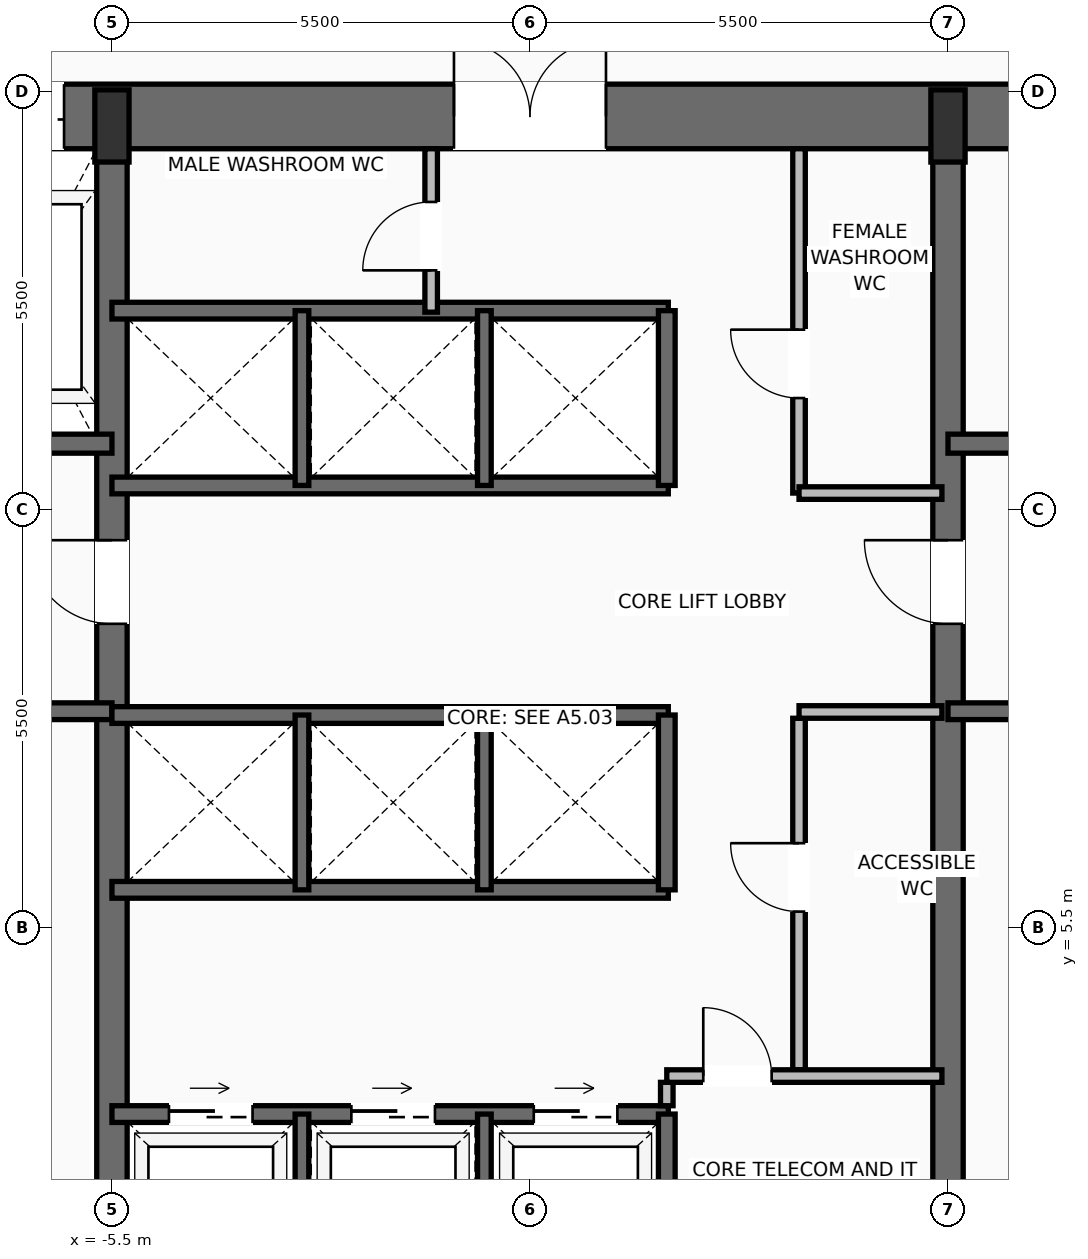
"""IFC4 building model, lengths in metres.
Left out: names, types, materials, properties, quantities, classifications, styles, units other than length and angle.
Written with IfcOpenShell. Run it as: python <this file> out.ifc"""

import sys

from ifc_helpers import new_model, si_unit, direction, frame, frame_2d, origin, origin_2d, place, context, subcontext, project, spatial, rectangle, extrude, source, transform, mapped, element, fill, save


model = new_model("IFC4")
c1 = context("Model", 3, precision=1e-05, world=origin(), true_north=direction((0.0, 1.0)))
c2 = subcontext(c1, "Body", "Model", "MODEL_VIEW")
j1 = project(units=[si_unit("LENGTHUNIT", "METRE"), si_unit("PLANEANGLEUNIT", "RADIAN")], contexts=[c1])
p1 = place(None, origin())
s1 = spatial("IfcSite", under=j1, at=p1, CompositionType="ELEMENT")
p2 = place(p1, origin())
s2 = spatial("IfcBuilding", under=s1, at=p2, CompositionType="ELEMENT")
p3 = place(p2, frame((0.0, 0.0, 46.0)))
s3 = spatial("IfcBuildingStorey", under=s2, at=p3, CompositionType="ELEMENT", Elevation=46.0)
p4 = place(p3, frame((-11.0, 16.175, 0.0), z_axis=(0.0, 0.0, 1.0), x_axis=(1.0, 0.0, 0.0)))
e1 = element("IfcWall", 1, at=p4, inside=s3, PredefinedType="SHEAR", context=c2, shape_type="SweptSolid", body=[
    extrude(rectangle(XDim=22.0, YDim=0.85, at=frame_2d((11.0, 0.0))), origin(), (0.0, 0.0, 1.0), 3.45),
])
p5 = place(p4, frame((3.57, 0.0, 0.0)))
e2 = element("IfcOpeningElement", 2, at=p5, cuts=e1, PredefinedType="OPENING", context=c2, shape_type="SweptSolid", body=[
    extrude(rectangle(XDim=1.3, YDim=2.3, at=frame_2d((0.65, 1.15))), frame((0.0, 0.435, 0.0), z_axis=(0.0, -1.0, 0.0), x_axis=(1.0, 0.0, 0.0)), (0.0, 0.0, 1.0), 0.87),
])
p6 = place(p4, frame((10.0, 0.0, 0.0)))
e3 = element("IfcOpeningElement", 3, at=p6, cuts=e1, PredefinedType="OPENING", context=c2, shape_type="SweptSolid", body=[
    extrude(rectangle(XDim=2.0, YDim=2.4, at=frame_2d((1.0, 1.2))), frame((0.0, 0.435, 0.0), z_axis=(0.0, -1.0, 0.0), x_axis=(1.0, 0.0, 0.0)), (0.0, 0.0, 1.0), 0.87),
])
p7 = place(p3, frame((-5.5, 0.425, 0.0), z_axis=(0.0, 0.0, 1.0), x_axis=(0.0, 1.0, 0.0)))
e4 = element("IfcWall", 4, at=p7, inside=s3, PredefinedType="SHEAR", context=c2, shape_type="SweptSolid", body=[
    extrude(rectangle(XDim=15.75, YDim=0.4, at=frame_2d((7.875, 0.0))), origin(), (0.0, 0.0, 1.0), 3.45),
])
p8 = place(p7, frame((9.075, 0.0, 0.0)))
e5 = element("IfcOpeningElement", 5, at=p8, cuts=e4, PredefinedType="OPENING", context=c2, shape_type="SweptSolid", body=[
    extrude(rectangle(XDim=1.1, YDim=2.2, at=frame_2d((0.55, 1.1))), frame((0.0, 0.21, 0.0), z_axis=(0.0, -1.0, 0.0), x_axis=(1.0, 0.0, 0.0)), (0.0, 0.0, 1.0), 0.42),
])
p9 = place(p3, frame((5.5, 0.425, 0.0), z_axis=(0.0, 0.0, 1.0), x_axis=(0.0, 1.0, 0.0)))
e6 = element("IfcWall", 6, at=p9, inside=s3, PredefinedType="SHEAR", context=c2, shape_type="SweptSolid", body=[
    extrude(rectangle(XDim=15.75, YDim=0.4, at=frame_2d((7.875, 0.0))), origin(), (0.0, 0.0, 1.0), 3.45),
])
p10 = place(p9, frame((9.075, 0.0, 0.0)))
e7 = element("IfcOpeningElement", 7, at=p10, cuts=e6, PredefinedType="OPENING", context=c2, shape_type="SweptSolid", body=[
    extrude(rectangle(XDim=1.1, YDim=2.2, at=frame_2d((0.55, 1.1))), frame((0.0, 0.21, 0.0), z_axis=(0.0, -1.0, 0.0), x_axis=(1.0, 0.0, 0.0)), (0.0, 0.0, 1.0), 0.42),
])
m1 = source(origin(), c2, "Body", "SweptSolid", [
    extrude(rectangle(XDim=0.45, YDim=0.95, at=origin_2d()), origin(), (0.0, 0.0, 1.0), 3.7),
])
for number, where, z_axis, x_axis in (
    (8, (-5.5, 16.05, 0.0), (0.0, 0.0, 1.0), (1.0, 0.0, 0.0)),
    (9, (5.5, 16.05, 0.0), (0.0, 0.0, 1.0), (1.0, 0.0, 0.0)),
):
    element("IfcColumn", number, at=place(p3, frame(where, z_axis=z_axis, x_axis=x_axis)), inside=s3, PredefinedType="PILASTER", context=c2, shape_type="MappedRepresentation", body=[
        mapped(m1, transform((0.0, 0.0, 0.0), scale=1.0)),
    ])
p11 = place(p3, frame((-5.5, 8.35, 0.0), z_axis=(0.0, 0.0, 1.0), x_axis=(-1.0, 0.0, 0.0)))
e10 = element("IfcWall", 10, at=p11, inside=s3, PredefinedType="SOLIDWALL", context=c2, shape_type="SweptSolid", body=[
    extrude(rectangle(XDim=4.65, YDim=0.22, at=frame_2d((2.325, 0.0))), origin(), (0.0, 0.0, 1.0), 3.45),
])
p12 = place(p11, frame((2.5, 0.0, 0.0)))
e11 = element("IfcOpeningElement", 11, at=p12, cuts=e10, PredefinedType="OPENING", context=c2, shape_type="SweptSolid", body=[
    extrude(rectangle(XDim=1.15, YDim=2.2, at=frame_2d((0.575, 1.1))), frame((0.0, 0.12, 0.0), z_axis=(0.0, -1.0, 0.0), x_axis=(1.0, 0.0, 0.0)), (0.0, 0.0, 1.0), 0.24),
])
p13 = place(p3, frame((-5.5, 11.87, 0.0), z_axis=(0.0, 0.0, 1.0), x_axis=(-1.0, 0.0, 0.0)))
e12 = element("IfcWall", 12, at=p13, inside=s3, PredefinedType="SOLIDWALL", context=c2, shape_type="SweptSolid", body=[
    extrude(rectangle(XDim=4.65, YDim=0.25, at=frame_2d((2.325, 0.0))), origin(), (0.0, 0.0, 1.0), 3.45),
])
p14 = place(p13, frame((2.95, 0.0, 0.0)))
e13 = element("IfcOpeningElement", 13, at=p14, cuts=e12, PredefinedType="OPENING", context=c2, shape_type="SweptSolid", body=[
    extrude(rectangle(XDim=1.2, YDim=2.25, at=frame_2d((0.6, 1.125))), frame((0.0, 0.135, 0.0), z_axis=(0.0, -1.0, 0.0), x_axis=(1.0, 0.0, 0.0)), (0.0, 0.0, 1.0), 0.27),
])
p15 = place(p3, frame((10.15, 8.35, 0.0), z_axis=(0.0, 0.0, 1.0), x_axis=(-1.0, 0.0, 0.0)))
e14 = element("IfcWall", 14, at=p15, inside=s3, PredefinedType="SOLIDWALL", context=c2, shape_type="SweptSolid", body=[
    extrude(rectangle(XDim=4.65, YDim=0.22, at=frame_2d((2.325, 0.0))), origin(), (0.0, 0.0, 1.0), 3.45),
])
p16 = place(p15, frame((1.0, 0.0, 0.0)))
e15 = element("IfcOpeningElement", 15, at=p16, cuts=e14, PredefinedType="OPENING", context=c2, shape_type="SweptSolid", body=[
    extrude(rectangle(XDim=1.15, YDim=2.2, at=frame_2d((0.575, 1.1))), frame((0.0, 0.12, 0.0), z_axis=(0.0, -1.0, 0.0), x_axis=(1.0, 0.0, 0.0)), (0.0, 0.0, 1.0), 0.24),
])
p17 = place(p3, frame((10.15, 11.87, 0.0), z_axis=(0.0, 0.0, 1.0), x_axis=(-1.0, 0.0, 0.0)))
e16 = element("IfcWall", 16, at=p17, inside=s3, PredefinedType="SOLIDWALL", context=c2, shape_type="SweptSolid", body=[
    extrude(rectangle(XDim=4.65, YDim=0.25, at=frame_2d((2.325, 0.0))), origin(), (0.0, 0.0, 1.0), 3.45),
])
p18 = place(p17, frame((0.5, 0.0, 0.0)))
e17 = element("IfcOpeningElement", 17, at=p18, cuts=e16, PredefinedType="OPENING", context=c2, shape_type="SweptSolid", body=[
    extrude(rectangle(XDim=1.2, YDim=2.25, at=frame_2d((0.6, 1.125))), frame((0.0, 0.135, 0.0), z_axis=(0.0, -1.0, 0.0), x_axis=(1.0, 0.0, 0.0)), (0.0, 0.0, 1.0), 0.27),
])
p19 = place(p3, frame((-5.5, 3.05, 0.0), z_axis=(0.0, 0.0, 1.0), x_axis=(1.0, 0.0, 0.0)))
e18 = element("IfcWall", 18, at=p19, inside=s3, PredefinedType="SOLIDWALL", context=c2, shape_type="SweptSolid", body=[
    extrude(rectangle(XDim=7.32, YDim=0.22, at=frame_2d((3.66, 0.0))), origin(), (0.0, 0.0, 1.0), 3.45),
])
p20 = place(p19, frame((0.75, 0.0, 0.0)))
e19 = element("IfcOpeningElement", 19, at=p20, cuts=e18, PredefinedType="OPENING", context=c2, shape_type="SweptSolid", body=[
    extrude(rectangle(XDim=1.1, YDim=2.2, at=frame_2d((0.55, 1.1))), frame((0.0, 0.12, 0.0), z_axis=(0.0, -1.0, 0.0), x_axis=(1.0, 0.0, 0.0)), (0.0, 0.0, 1.0), 0.24),
])
p21 = place(p19, frame((3.15, 0.0, 0.0)))
e20 = element("IfcOpeningElement", 20, at=p21, cuts=e18, PredefinedType="OPENING", context=c2, shape_type="SweptSolid", body=[
    extrude(rectangle(XDim=1.1, YDim=2.2, at=frame_2d((0.55, 1.1))), frame((0.0, 0.12, 0.0), z_axis=(0.0, -1.0, 0.0), x_axis=(1.0, 0.0, 0.0)), (0.0, 0.0, 1.0), 0.24),
])
p22 = place(p19, frame((5.55, 0.0, 0.0)))
e21 = element("IfcOpeningElement", 21, at=p22, cuts=e18, PredefinedType="OPENING", context=c2, shape_type="SweptSolid", body=[
    extrude(rectangle(XDim=1.1, YDim=2.2, at=frame_2d((0.55, 1.1))), frame((0.0, 0.12, 0.0), z_axis=(0.0, -1.0, 0.0), x_axis=(1.0, 0.0, 0.0)), (0.0, 0.0, 1.0), 0.24),
])
p23 = place(p3, frame((1.8, 0.85, 0.0), z_axis=(0.0, 0.0, 1.0), x_axis=(0.0, 1.0, 0.0)))
e22 = element("IfcWall", 22, at=p23, inside=s3, PredefinedType="SOLIDWALL", context=c2, shape_type="SweptSolid", body=[
    extrude(rectangle(XDim=2.2, YDim=0.22, at=frame_2d((1.1, 0.0))), origin(), (0.0, 0.0, 1.0), 3.45),
])
for number, where, z_axis, x_axis in (
    (23, (-3.0, 0.85, 0.0), (0.0, 0.0, 1.0), (0.0, 1.0, 0.0)),
    (24, (-0.6, 0.85, 0.0), (0.0, 0.0, 1.0), (0.0, 1.0, 0.0)),
):
    element("IfcWall", number, at=place(p3, frame(where, z_axis=z_axis, x_axis=x_axis)), inside=s3, PredefinedType="SOLIDWALL", context=c2, shape_type="SweptSolid", body=[
        extrude(rectangle(XDim=2.2, YDim=0.18, at=frame_2d((1.1, 0.0))), origin(), (0.0, 0.0, 1.0), 3.45),
    ])
p24 = place(p3, frame((1.8, 3.16, 0.0), z_axis=(0.0, 0.0, 1.0), x_axis=(0.0, 1.0, 0.0)))
e25 = element("IfcWall", 25, at=p24, inside=s3, PredefinedType="PARTITIONING", context=c2, shape_type="SweptSolid", body=[
    extrude(rectangle(XDim=0.308, YDim=0.165, at=frame_2d((0.154, 0.0))), origin(), (0.0, 0.0, 1.0), 3.442),
])
p25 = place(p3, frame((3.54, 3.633, 0.0), z_axis=(0.0, 0.0, 1.0), x_axis=(0.0, 1.0, 0.0)))
e26 = element("IfcWall", 26, at=p25, inside=s3, PredefinedType="PARTITIONING", context=c2, shape_type="SweptSolid", body=[
    extrude(rectangle(XDim=4.625, YDim=0.165, at=frame_2d((2.312, 0.0))), origin(), (0.0, 0.0, 1.0), 3.442),
])
p26 = place(p25, frame((2.081, 0.0, 0.0)))
e27 = element("IfcOpeningElement", 27, at=p26, cuts=e26, PredefinedType="OPENING", context=c2, shape_type="SweptSolid", body=[
    extrude(rectangle(XDim=0.9, YDim=2.1, at=frame_2d((0.45, 1.05))), frame((0.0, 0.093, 0.0), z_axis=(0.0, -1.0, 0.0), x_axis=(1.0, 0.0, 0.0)), (0.0, 0.0, 1.0), 0.185),
])
p27 = place(p3, frame((3.54, 8.34, 0.0), z_axis=(0.0, 0.0, 1.0), x_axis=(1.0, 0.0, 0.0)))
e28 = element("IfcWall", 28, at=p27, inside=s3, PredefinedType="PARTITIONING", context=c2, shape_type="SweptSolid", body=[
    extrude(rectangle(XDim=1.88, YDim=0.165, at=frame_2d((0.94, 0.0))), origin(), (0.0, 0.0, 1.0), 3.442),
])
p28 = place(p3, frame((1.8, 3.55, 0.0), z_axis=(0.0, 0.0, 1.0), x_axis=(1.0, 0.0, 0.0)))
e29 = element("IfcWall", 29, at=p28, inside=s3, PredefinedType="PARTITIONING", context=c2, shape_type="SweptSolid", body=[
    extrude(rectangle(XDim=3.62, YDim=0.165, at=frame_2d((1.81, 0.0))), origin(), (0.0, 0.0, 1.0), 3.442),
])
p29 = place(p28, frame((0.48, 0.0, 0.0)))
e30 = element("IfcOpeningElement", 30, at=p29, cuts=e29, PredefinedType="OPENING", context=c2, shape_type="SweptSolid", body=[
    extrude(rectangle(XDim=0.9, YDim=2.1, at=frame_2d((0.45, 1.05))), frame((0.0, 0.093, 0.0), z_axis=(0.0, -1.0, 0.0), x_axis=(1.0, 0.0, 0.0)), (0.0, 0.0, 1.0), 0.185),
])
for number, where, z_axis, x_axis in (
    (31, (-5.5, 6.0, 0.0), (0.0, 0.0, 1.0), (1.0, 0.0, 0.0)),
    (32, (-5.5, 8.3, 0.0), (0.0, 0.0, 1.0), (1.0, 0.0, 0.0)),
):
    element("IfcWall", number, at=place(p3, frame(where, z_axis=z_axis, x_axis=x_axis)), inside=s3, PredefinedType="SOLIDWALL", context=c2, shape_type="SweptSolid", body=[
        extrude(rectangle(XDim=7.32, YDim=0.22, at=frame_2d((3.66, 0.0))), origin(), (0.0, 0.0, 1.0), 3.45),
    ])
p30 = place(p3, frame((1.8, 6.0, 0.0), z_axis=(0.0, 0.0, 1.0), x_axis=(0.0, 1.0, 0.0)))
e33 = element("IfcWall", 33, at=p30, inside=s3, PredefinedType="SOLIDWALL", context=c2, shape_type="SweptSolid", body=[
    extrude(rectangle(XDim=2.3, YDim=0.22, at=frame_2d((1.15, 0.0))), origin(), (0.0, 0.0, 1.0), 3.45),
])
for number, where, z_axis, x_axis in (
    (34, (-3.0, 6.0, 0.0), (0.0, 0.0, 1.0), (0.0, 1.0, 0.0)),
    (35, (-0.6, 6.0, 0.0), (0.0, 0.0, 1.0), (0.0, 1.0, 0.0)),
):
    element("IfcWall", number, at=place(p3, frame(where, z_axis=z_axis, x_axis=x_axis)), inside=s3, PredefinedType="SOLIDWALL", context=c2, shape_type="SweptSolid", body=[
        extrude(rectangle(XDim=2.3, YDim=0.18, at=frame_2d((1.15, 0.0))), origin(), (0.0, 0.0, 1.0), 3.45),
    ])
for number, where, z_axis, x_axis in (
    (36, (-5.5, 11.32, 0.0), (0.0, 0.0, 1.0), (1.0, 0.0, 0.0)),
    (37, (-5.5, 13.62, 0.0), (0.0, 0.0, 1.0), (1.0, 0.0, 0.0)),
):
    element("IfcWall", number, at=place(p3, frame(where, z_axis=z_axis, x_axis=x_axis)), inside=s3, PredefinedType="SOLIDWALL", context=c2, shape_type="SweptSolid", body=[
        extrude(rectangle(XDim=7.32, YDim=0.22, at=frame_2d((3.66, 0.0))), origin(), (0.0, 0.0, 1.0), 3.45),
    ])
p31 = place(p3, frame((1.8, 11.32, 0.0), z_axis=(0.0, 0.0, 1.0), x_axis=(0.0, 1.0, 0.0)))
e38 = element("IfcWall", 38, at=p31, inside=s3, PredefinedType="SOLIDWALL", context=c2, shape_type="SweptSolid", body=[
    extrude(rectangle(XDim=2.3, YDim=0.22, at=frame_2d((1.15, 0.0))), origin(), (0.0, 0.0, 1.0), 3.45),
])
for number, where, z_axis, x_axis in (
    (39, (-3.0, 11.32, 0.0), (0.0, 0.0, 1.0), (0.0, 1.0, 0.0)),
    (40, (-0.6, 11.32, 0.0), (0.0, 0.0, 1.0), (0.0, 1.0, 0.0)),
):
    element("IfcWall", number, at=place(p3, frame(where, z_axis=z_axis, x_axis=x_axis)), inside=s3, PredefinedType="SOLIDWALL", context=c2, shape_type="SweptSolid", body=[
        extrude(rectangle(XDim=2.3, YDim=0.18, at=frame_2d((1.15, 0.0))), origin(), (0.0, 0.0, 1.0), 3.45),
    ])
p32 = place(p3, frame((-1.3, 13.6, 0.0), z_axis=(0.0, 0.0, 1.0), x_axis=(0.0, 1.0, 0.0)))
e41 = element("IfcWall", 41, at=p32, inside=s3, PredefinedType="PARTITIONING", context=c2, shape_type="SweptSolid", body=[
    extrude(rectangle(XDim=2.15, YDim=0.165, at=frame_2d((1.075, 0.0))), origin(), (0.0, 0.0, 1.0), 3.442),
])
p33 = place(p32, frame((0.55, 0.0, 0.0)))
e42 = element("IfcOpeningElement", 42, at=p33, cuts=e41, PredefinedType="OPENING", context=c2, shape_type="SweptSolid", body=[
    extrude(rectangle(XDim=0.9, YDim=2.1, at=frame_2d((0.45, 1.05))), frame((0.0, 0.093, 0.0), z_axis=(0.0, -1.0, 0.0), x_axis=(1.0, 0.0, 0.0)), (0.0, 0.0, 1.0), 0.185),
])
p34 = place(p3, frame((3.54, 11.22, 0.0), z_axis=(0.0, 0.0, 1.0), x_axis=(0.0, 1.0, 0.0)))
e43 = element("IfcWall", 43, at=p34, inside=s3, PredefinedType="PARTITIONING", context=c2, shape_type="SweptSolid", body=[
    extrude(rectangle(XDim=4.53, YDim=0.165, at=frame_2d((2.265, 0.0))), origin(), (0.0, 0.0, 1.0), 3.442),
])
p35 = place(p34, frame((1.25, 0.0, 0.0)))
e44 = element("IfcOpeningElement", 44, at=p35, cuts=e43, PredefinedType="OPENING", context=c2, shape_type="SweptSolid", body=[
    extrude(rectangle(XDim=0.9, YDim=2.1, at=frame_2d((0.45, 1.05))), frame((0.0, 0.093, 0.0), z_axis=(0.0, -1.0, 0.0), x_axis=(1.0, 0.0, 0.0)), (0.0, 0.0, 1.0), 0.185),
])
p36 = place(p3, frame((3.54, 11.22, 0.0), z_axis=(0.0, 0.0, 1.0), x_axis=(1.0, 0.0, 0.0)))
e45 = element("IfcWall", 45, at=p36, inside=s3, PredefinedType="PARTITIONING", context=c2, shape_type="SweptSolid", body=[
    extrude(rectangle(XDim=1.88, YDim=0.165, at=frame_2d((0.94, 0.0))), origin(), (0.0, 0.0, 1.0), 3.442),
])
m2 = source(origin(), c2, "Body", "SweptSolid", [
    extrude(rectangle(XDim=1.1, YDim=2.2, at=frame_2d((0.55, 1.1))), frame((0.0, 0.025, 0.0), z_axis=(0.0, -1.0, 0.0), x_axis=(1.0, 0.0, 0.0)), (0.0, 0.0, 1.0), 0.05),
])
p37 = place(p8, origin())
e46 = element("IfcDoor", 46, at=p37, inside=s3, OperationType="SINGLE_SWING_RIGHT", PredefinedType="DOOR", context=c2, shape_type="MappedRepresentation", body=[
    mapped(m2, transform((0.0, 0.0, 0.0), scale=1.0)),
])
fill(e5, e46)
m3 = source(origin(), c2, "Body", "SweptSolid", [
    extrude(rectangle(XDim=1.3, YDim=2.3, at=frame_2d((0.65, 1.15))), frame((0.0, 0.025, 0.0), z_axis=(0.0, -1.0, 0.0), x_axis=(1.0, 0.0, 0.0)), (0.0, 0.0, 1.0), 0.05),
])
p38 = place(p5, origin())
e47 = element("IfcDoor", 47, at=p38, inside=s3, OperationType="SLIDING_TO_RIGHT", PredefinedType="DOOR", context=c2, shape_type="MappedRepresentation", body=[
    mapped(m3, transform((0.0, 0.0, 0.0), scale=1.0)),
])
fill(e2, e47)
p39 = place(p10, origin())
e48 = element("IfcDoor", 48, at=p39, inside=s3, OperationType="SINGLE_SWING_RIGHT", PredefinedType="DOOR", context=c2, shape_type="MappedRepresentation", body=[
    mapped(m2, transform((0.0, 0.0, 0.0), scale=1.0)),
])
fill(e7, e48)
m4 = source(origin(), c2, "Body", "SweptSolid", [
    extrude(rectangle(XDim=2.0, YDim=2.4, at=frame_2d((1.0, 1.2))), frame((0.0, 0.025, 0.0), z_axis=(0.0, -1.0, 0.0), x_axis=(1.0, 0.0, 0.0)), (0.0, 0.0, 1.0), 0.05),
])
p40 = place(p6, origin())
e49 = element("IfcDoor", 49, at=p40, inside=s3, OperationType="DOUBLE_DOOR_SINGLE_SWING", PredefinedType="DOOR", context=c2, shape_type="MappedRepresentation", body=[
    mapped(m4, transform((0.0, 0.0, 0.0), scale=1.0)),
])
fill(e3, e49)
m5 = source(origin(), c2, "Body", "SweptSolid", [
    extrude(rectangle(XDim=1.1, YDim=2.2, at=frame_2d((0.55, 1.1))), frame((0.0, 0.025, 0.0), z_axis=(0.0, -1.0, 0.0), x_axis=(1.0, 0.0, 0.0)), (0.0, 0.0, 1.0), 0.05),
])
p41 = place(p20, origin())
e50 = element("IfcDoor", 50, at=p41, inside=s3, OperationType="SLIDING_TO_RIGHT", PredefinedType="DOOR", context=c2, shape_type="MappedRepresentation", body=[
    mapped(m5, transform((0.0, 0.0, 0.0), scale=1.0)),
])
fill(e19, e50)
p42 = place(p21, origin())
e51 = element("IfcDoor", 51, at=p42, inside=s3, OperationType="SLIDING_TO_RIGHT", PredefinedType="DOOR", context=c2, shape_type="MappedRepresentation", body=[
    mapped(m5, transform((0.0, 0.0, 0.0), scale=1.0)),
])
fill(e20, e51)
p43 = place(p22, origin())
e52 = element("IfcDoor", 52, at=p43, inside=s3, OperationType="SLIDING_TO_RIGHT", PredefinedType="DOOR", context=c2, shape_type="MappedRepresentation", body=[
    mapped(m5, transform((0.0, 0.0, 0.0), scale=1.0)),
])
fill(e21, e52)
m6 = source(origin(), c2, "Body", "SweptSolid", [
    extrude(rectangle(XDim=0.9, YDim=2.1, at=frame_2d((0.45, 1.05))), frame((0.0, 0.025, 0.0), z_axis=(0.0, -1.0, 0.0), x_axis=(1.0, 0.0, 0.0)), (0.0, 0.0, 1.0), 0.05),
])
p44 = place(p29, origin())
e53 = element("IfcDoor", 53, at=p44, inside=s3, OperationType="SINGLE_SWING_LEFT", PredefinedType="DOOR", context=c2, shape_type="MappedRepresentation", body=[
    mapped(m6, transform((0.0, 0.0, 0.0), scale=1.0)),
])
fill(e30, e53)
p45 = place(p26, origin())
e54 = element("IfcDoor", 54, at=p45, inside=s3, OperationType="SINGLE_SWING_RIGHT", PredefinedType="DOOR", context=c2, shape_type="MappedRepresentation", body=[
    mapped(m6, transform((0.0, 0.0, 0.0), scale=1.0)),
])
fill(e27, e54)
p46 = place(p33, origin())
e55 = element("IfcDoor", 55, at=p46, inside=s3, OperationType="SINGLE_SWING_LEFT", PredefinedType="DOOR", context=c2, shape_type="MappedRepresentation", body=[
    mapped(m6, transform((0.0, 0.0, 0.0), scale=1.0)),
])
fill(e42, e55)
p47 = place(p35, origin())
e56 = element("IfcDoor", 56, at=p47, inside=s3, OperationType="SINGLE_SWING_RIGHT", PredefinedType="DOOR", context=c2, shape_type="MappedRepresentation", body=[
    mapped(m6, transform((0.0, 0.0, 0.0), scale=1.0)),
])
fill(e44, e56)
save(model, sys.argv[1])
